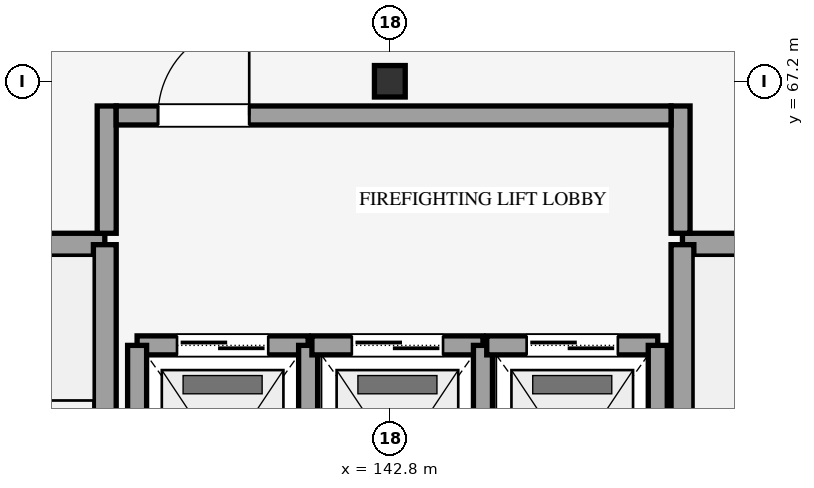
"""IFC4 building model, lengths in metres.
Left out: names, types, materials, properties, quantities, classifications, styles, units other than length and angle.
Written with IfcOpenShell. Run it as: python <this file> out.ifc"""

import sys

from ifc_helpers import new_model, si_unit, direction, frame, frame_2d, origin, origin_2d, place, context, subcontext, project, spatial, rectangle, i_section, extrude, element, fill, save


model = new_model("IFC4")
c1 = context("Model", 3, precision=1e-05, world=origin(), true_north=direction((0.0, 1.0)))
c2 = subcontext(c1, "Body", "Model", "MODEL_VIEW")
j1 = project(units=[si_unit("LENGTHUNIT", "METRE"), si_unit("PLANEANGLEUNIT", "RADIAN")], contexts=[c1])
p1 = place(None, origin())
s1 = spatial("IfcSite", under=j1, at=p1, CompositionType="ELEMENT")
p2 = place(p1, origin())
s2 = spatial("IfcBuilding", under=s1, at=p2, CompositionType="ELEMENT")
p3 = place(p2, origin())
s3 = spatial("IfcBuildingStorey", under=s2, at=p3, CompositionType="ELEMENT", Elevation=0.0)
p4 = place(p3, frame((142.8, 67.2, 0.0), z_axis=(0.0, 0.0, 1.0), x_axis=(1.0, 0.0, 0.0)))
e1 = element("IfcColumn", 1, at=p4, inside=s3, PredefinedType="COLUMN", context=c2, shape_type="SweptSolid", body=[
    extrude(i_section(OverallWidth=0.405, OverallDepth=0.414, WebThickness=0.018, FlangeThickness=0.028, FilletRadius=0.022, at=origin_2d()), origin(), (0.0, 0.0, 1.0), 5.4),
])
p5 = place(p3, frame((135.05, 65.05, 0.0), z_axis=(0.0, 0.0, 1.0), x_axis=(1.0, 0.0, 0.0)))
e2 = element("IfcWall", 2, at=p5, inside=s3, PredefinedType="SHEAR", context=c2, shape_type="SweptSolid", body=[
    extrude(rectangle(XDim=4.0, YDim=0.3, at=frame_2d((2.0, 0.0))), origin(), (0.0, 0.0, 1.0), 5.4),
])
p6 = place(p3, frame((139.05, 50.75, 0.0), z_axis=(0.0, 0.0, 1.0), x_axis=(0.0, 1.0, 0.0)))
e3 = element("IfcWall", 3, at=p6, inside=s3, PredefinedType="SHEAR", context=c2, shape_type="SweptSolid", body=[
    extrude(rectangle(XDim=14.3, YDim=0.3, at=frame_2d((7.15, 0.0))), origin(), (0.0, 0.0, 1.0), 5.4),
])
p7 = place(p3, frame((146.65, 65.05, 0.0), z_axis=(0.0, 0.0, 1.0), x_axis=(1.0, 0.0, 0.0)))
e4 = element("IfcWall", 4, at=p7, inside=s3, PredefinedType="SHEAR", context=c2, shape_type="SweptSolid", body=[
    extrude(rectangle(XDim=4.0, YDim=0.3, at=frame_2d((2.0, 0.0))), origin(), (0.0, 0.0, 1.0), 5.4),
])
p8 = place(p3, frame((146.65, 50.75, 0.0), z_axis=(0.0, 0.0, 1.0), x_axis=(0.0, 1.0, 0.0)))
e5 = element("IfcWall", 5, at=p8, inside=s3, PredefinedType="SHEAR", context=c2, shape_type="SweptSolid", body=[
    extrude(rectangle(XDim=14.3, YDim=0.3, at=frame_2d((7.15, 0.0))), origin(), (0.0, 0.0, 1.0), 5.4),
])
p9 = place(p3, frame((139.475, 63.725, 0.0), z_axis=(0.0, 0.0, 1.0), x_axis=(1.0, 0.0, 0.0)))
e6 = element("IfcWall", 6, at=p9, inside=s3, PredefinedType="SHEAR", context=c2, shape_type="SweptSolid", body=[
    extrude(rectangle(XDim=2.25, YDim=0.25, at=frame_2d((1.125, 0.0))), origin(), (0.0, 0.0, 1.0), 5.14),
])
p10 = place(p9, frame((0.525, 0.0, 0.0)))
e7 = element("IfcOpeningElement", 7, at=p10, cuts=e6, PredefinedType="OPENING", context=c2, shape_type="SweptSolid", body=[
    extrude(rectangle(XDim=1.2, YDim=2.18, at=frame_2d((0.6, 1.09))), frame((0.0, 0.135, 0.0), z_axis=(0.0, -1.0, 0.0), x_axis=(1.0, 0.0, 0.0)), (0.0, 0.0, 1.0), 0.27),
])
for number, where, z_axis, x_axis in (
    (8, (139.475, 60.675, 0.0), (0.0, 0.0, 1.0), (0.0, 1.0, 0.0)),
    (9, (141.725, 60.675, 0.0), (0.0, 0.0, 1.0), (0.0, 1.0, 0.0)),
):
    element("IfcWall", number, at=place(p3, frame(where, z_axis=z_axis, x_axis=x_axis)), inside=s3, PredefinedType="SHEAR", context=c2, shape_type="SweptSolid", body=[
        extrude(rectangle(XDim=3.05, YDim=0.25, at=frame_2d((1.525, 0.0))), origin(), (0.0, 0.0, 1.0), 5.14),
    ])
p11 = place(p3, frame((141.775, 63.725, 0.0), z_axis=(0.0, 0.0, 1.0), x_axis=(1.0, 0.0, 0.0)))
e10 = element("IfcWall", 10, at=p11, inside=s3, PredefinedType="SHEAR", context=c2, shape_type="SweptSolid", body=[
    extrude(rectangle(XDim=2.25, YDim=0.25, at=frame_2d((1.125, 0.0))), origin(), (0.0, 0.0, 1.0), 5.14),
])
p12 = place(p11, frame((0.525, 0.0, 0.0)))
e11 = element("IfcOpeningElement", 11, at=p12, cuts=e10, PredefinedType="OPENING", context=c2, shape_type="SweptSolid", body=[
    extrude(rectangle(XDim=1.2, YDim=2.18, at=frame_2d((0.6, 1.09))), frame((0.0, 0.135, 0.0), z_axis=(0.0, -1.0, 0.0), x_axis=(1.0, 0.0, 0.0)), (0.0, 0.0, 1.0), 0.27),
])
p13 = place(p3, frame((144.025, 60.675, 0.0), z_axis=(0.0, 0.0, 1.0), x_axis=(0.0, 1.0, 0.0)))
e12 = element("IfcWall", 12, at=p13, inside=s3, PredefinedType="SHEAR", context=c2, shape_type="SweptSolid", body=[
    extrude(rectangle(XDim=3.05, YDim=0.25, at=frame_2d((1.525, 0.0))), origin(), (0.0, 0.0, 1.0), 5.14),
])
p14 = place(p3, frame((144.075, 63.725, 0.0), z_axis=(0.0, 0.0, 1.0), x_axis=(1.0, 0.0, 0.0)))
e13 = element("IfcWall", 13, at=p14, inside=s3, PredefinedType="SHEAR", context=c2, shape_type="SweptSolid", body=[
    extrude(rectangle(XDim=2.25, YDim=0.25, at=frame_2d((1.125, 0.0))), origin(), (0.0, 0.0, 1.0), 5.14),
])
p15 = place(p14, frame((0.525, 0.0, 0.0)))
e14 = element("IfcOpeningElement", 14, at=p15, cuts=e13, PredefinedType="OPENING", context=c2, shape_type="SweptSolid", body=[
    extrude(rectangle(XDim=1.2, YDim=2.18, at=frame_2d((0.6, 1.09))), frame((0.0, 0.135, 0.0), z_axis=(0.0, -1.0, 0.0), x_axis=(1.0, 0.0, 0.0)), (0.0, 0.0, 1.0), 0.27),
])
p16 = place(p3, frame((146.325, 60.675, 0.0), z_axis=(0.0, 0.0, 1.0), x_axis=(0.0, 1.0, 0.0)))
e15 = element("IfcWall", 15, at=p16, inside=s3, PredefinedType="SHEAR", context=c2, shape_type="SweptSolid", body=[
    extrude(rectangle(XDim=3.05, YDim=0.25, at=frame_2d((1.525, 0.0))), origin(), (0.0, 0.0, 1.0), 5.14),
])
for number, where, z_axis, x_axis in (
    (16, (139.075, 65.2, 0.0), (0.0, 0.0, 1.0), (0.0, 1.0, 0.0)),
    (17, (146.625, 65.2, 0.0), (0.0, 0.0, 1.0), (0.0, 1.0, 0.0)),
):
    element("IfcWall", number, at=place(p3, frame(where, z_axis=z_axis, x_axis=x_axis)), inside=s3, PredefinedType="SHEAR", context=c2, shape_type="SweptSolid", body=[
        extrude(rectangle(XDim=1.675, YDim=0.25, at=frame_2d((0.837, 0.0))), origin(), (0.0, 0.0, 1.0), 5.14),
    ])
p17 = place(p3, frame((139.2, 66.75, 0.0), z_axis=(0.0, 0.0, 1.0), x_axis=(1.0, 0.0, 0.0)))
e18 = element("IfcWall", 18, at=p17, inside=s3, PredefinedType="SHEAR", context=c2, shape_type="SweptSolid", body=[
    extrude(rectangle(XDim=7.3, YDim=0.25, at=frame_2d((3.65, 0.0))), origin(), (0.0, 0.0, 1.0), 5.14),
])
p18 = place(p17, frame((0.55, 0.0, 0.0)))
e19 = element("IfcOpeningElement", 19, at=p18, cuts=e18, PredefinedType="OPENING", context=c2, shape_type="SweptSolid", body=[
    extrude(rectangle(XDim=1.2, YDim=2.15, at=frame_2d((0.6, 1.075))), frame((0.0, 0.135, 0.0), z_axis=(0.0, -1.0, 0.0), x_axis=(1.0, 0.0, 0.0)), (0.0, 0.0, 1.0), 0.27),
])
p19 = place(p10, origin())
e20 = element("IfcDoor", 20, at=p19, inside=s3, OperationType="DOUBLE_DOOR_SLIDING", PredefinedType="DOOR", context=c2, shape_type="SweptSolid", body=[
    extrude(rectangle(XDim=1.2, YDim=2.18, at=frame_2d((0.6, 1.09))), frame((0.0, 0.025, 0.0), z_axis=(0.0, -1.0, 0.0), x_axis=(1.0, 0.0, 0.0)), (0.0, 0.0, 1.0), 0.05),
])
fill(e7, e20)
p20 = place(p12, origin())
e21 = element("IfcDoor", 21, at=p20, inside=s3, OperationType="DOUBLE_DOOR_SLIDING", PredefinedType="DOOR", context=c2, shape_type="SweptSolid", body=[
    extrude(rectangle(XDim=1.2, YDim=2.18, at=frame_2d((0.6, 1.09))), frame((0.0, 0.025, 0.0), z_axis=(0.0, -1.0, 0.0), x_axis=(1.0, 0.0, 0.0)), (0.0, 0.0, 1.0), 0.05),
])
fill(e11, e21)
p21 = place(p15, origin())
e22 = element("IfcDoor", 22, at=p21, inside=s3, OperationType="DOUBLE_DOOR_SLIDING", PredefinedType="DOOR", context=c2, shape_type="SweptSolid", body=[
    extrude(rectangle(XDim=1.2, YDim=2.18, at=frame_2d((0.6, 1.09))), frame((0.0, 0.025, 0.0), z_axis=(0.0, -1.0, 0.0), x_axis=(1.0, 0.0, 0.0)), (0.0, 0.0, 1.0), 0.05),
])
fill(e14, e22)
p22 = place(p18, origin())
e23 = element("IfcDoor", 23, at=p22, inside=s3, OperationType="SINGLE_SWING_RIGHT", PredefinedType="DOOR", context=c2, shape_type="SweptSolid", body=[
    extrude(rectangle(XDim=1.2, YDim=2.15, at=frame_2d((0.6, 1.075))), frame((0.0, 0.025, 0.0), z_axis=(0.0, -1.0, 0.0), x_axis=(1.0, 0.0, 0.0)), (0.0, 0.0, 1.0), 0.05),
])
fill(e19, e23)
save(model, sys.argv[1])
